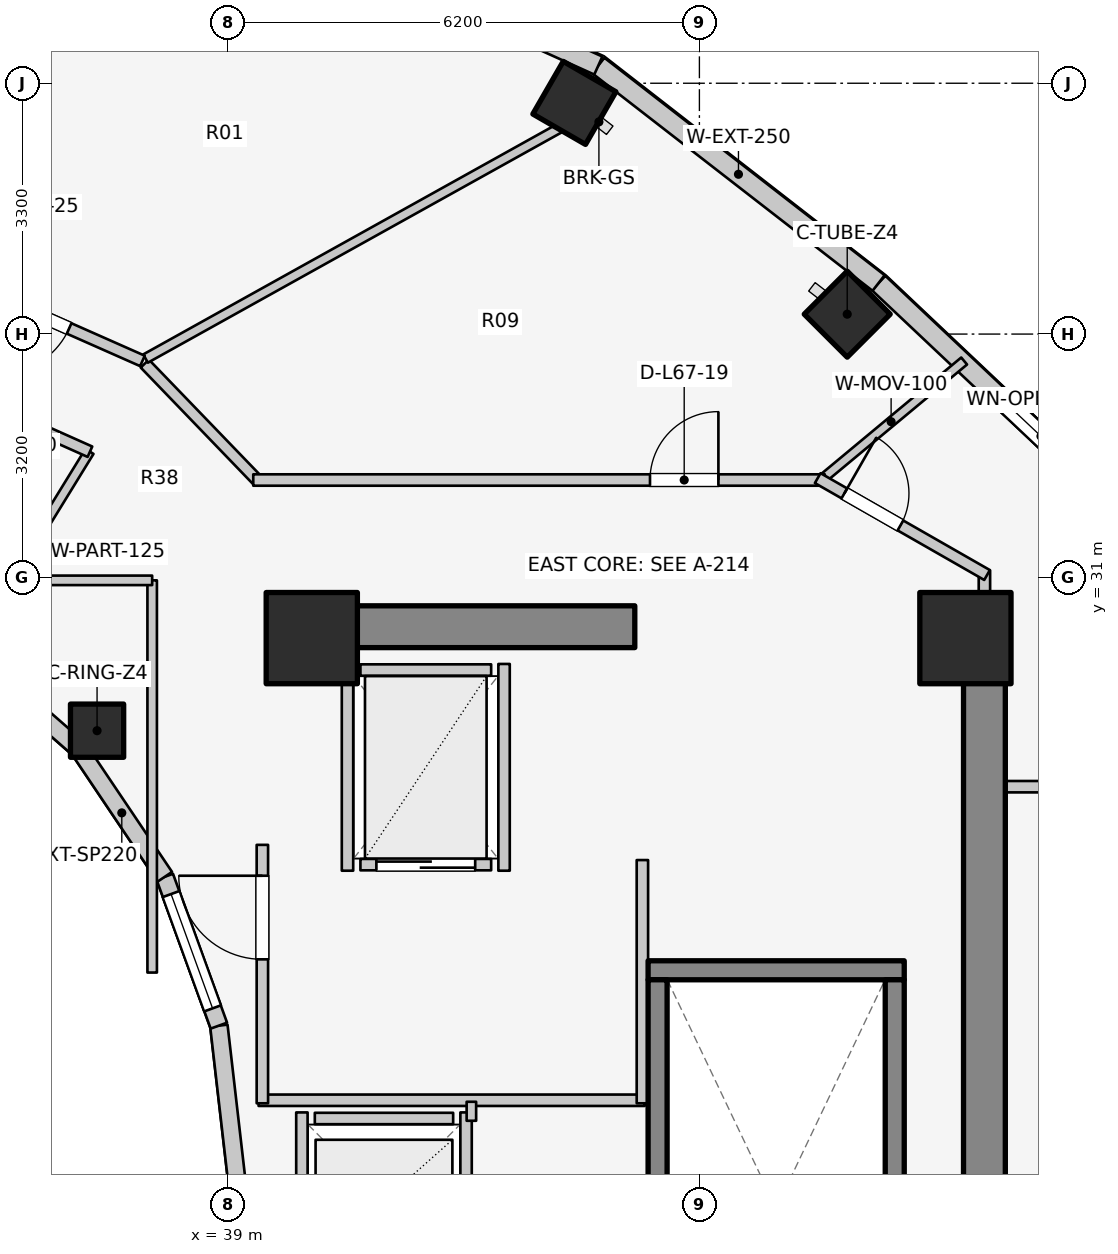
"""IFC4 building model, lengths in metres.
Left out: names, types, materials, properties, quantities, classifications, styles, units other than length and angle.
Written with IfcOpenShell. Run it as: python <this file> out.ifc"""

import sys

from ifc_helpers import new_model, si_unit, direction, frame, frame_2d, origin, origin_2d, place, context, subcontext, project, spatial, rectangle, extrude, element, fill, save


model = new_model("IFC4")
c1 = context("Model", 3, precision=1e-05, world=origin(), true_north=direction((0.0, 1.0)))
c2 = subcontext(c1, "Body", "Model", "MODEL_VIEW")
j1 = project(units=[si_unit("LENGTHUNIT", "METRE"), si_unit("PLANEANGLEUNIT", "RADIAN")], contexts=[c1])
p1 = place(None, origin())
s1 = spatial("IfcSite", under=j1, at=p1, CompositionType="ELEMENT")
p2 = place(p1, origin())
s2 = spatial("IfcBuilding", under=s1, at=p2, CompositionType="ELEMENT")
p3 = place(p2, frame((0.0, 0.0, 220.2)))
s3 = spatial("IfcBuildingStorey", under=s2, at=p3, CompositionType="ELEMENT", Elevation=220.2)
p4 = place(p3, frame((48.95, 17.05, 0.0), z_axis=(0.0, 0.0, 1.0), x_axis=(0.0, 1.0, 0.0)))
e1 = element("IfcWall", 1, at=p4, inside=s3, PredefinedType="SHEAR", context=c2, shape_type="SweptSolid", body=[
    extrude(rectangle(XDim=12.8, YDim=0.55, at=frame_2d((6.4, 0.0))), origin(), (0.0, 0.0, 1.0), 3.1),
])
p5 = place(p3, frame((39.85, 30.35, 0.0), z_axis=(0.0, 0.0, 1.0), x_axis=(1.0, 0.0, 0.0)))
e2 = element("IfcWall", 2, at=p5, inside=s3, PredefinedType="SHEAR", context=c2, shape_type="SweptSolid", body=[
    extrude(rectangle(XDim=4.5, YDim=0.55, at=frame_2d((2.25, 0.0))), origin(), (0.0, 0.0, 1.0), 3.1),
])
p6 = place(p3, frame((44.525, 25.83, 0.0), z_axis=(0.0, 0.0, 1.0), x_axis=(1.0, 0.0, 0.0)))
e3 = element("IfcWall", 3, at=p6, inside=s3, PredefinedType="SOLIDWALL", context=c2, shape_type="SweptSolid", body=[
    extrude(rectangle(XDim=3.37, YDim=0.25, at=frame_2d((1.685, 0.0))), origin(), (0.0, 0.0, 1.0), 3.1),
])
for number, where, z_axis, x_axis in (
    (4, (44.65, 17.895, 0.0), (0.0, 0.0, 1.0), (0.0, 1.0, 0.0)),
    (5, (47.77, 17.895, 0.0), (0.0, 0.0, 1.0), (0.0, 1.0, 0.0)),
):
    element("IfcWall", number, at=place(p3, frame(where, z_axis=z_axis, x_axis=x_axis)), inside=s3, PredefinedType="SOLIDWALL", context=c2, shape_type="SweptSolid", body=[
        extrude(rectangle(XDim=7.81, YDim=0.25, at=frame_2d((3.905, 0.0))), origin(), (0.0, 0.0, 1.0), 3.1),
    ])
for number, where, z_axis, x_axis in (
    (6, (48.7, 30.2, 0.0), (0.0, 0.0, 1.0), (1.0, 0.0, 0.0)),
    (7, (40.1, 30.2, 0.0), (0.0, 0.0, 1.0), (1.0, 0.0, 0.0)),
):
    element("IfcColumn", number, at=place(p3, frame(where, z_axis=z_axis, x_axis=x_axis)), inside=s3, PredefinedType="COLUMN", context=c2, shape_type="SweptSolid", body=[
        extrude(rectangle(XDim=1.2, YDim=1.2, at=origin_2d()), origin(), (0.0, 0.0, 1.0), 3.1),
    ])
p7 = place(p3, frame((37.275, 28.982, 0.0), z_axis=(0.0, 0.0, 1.0), x_axis=(1.0, 0.0, 0.0)))
e8 = element("IfcColumn", 8, at=p7, inside=s3, PredefinedType="COLUMN", context=c2, shape_type="SweptSolid", body=[
    extrude(rectangle(XDim=0.7, YDim=0.7, at=origin_2d()), origin(), (0.0, 0.0, 1.0), 3.1),
])
for number, where, z_axis, x_axis in (
    (9, (47.145, 34.462, 0.0), (0.0, 0.0, 1.0), (0.707, 0.707, 0.0)),
    (10, (43.555, 37.241, 0.0), (0.0, 0.0, 1.0), (0.5, 0.866, 0.0)),
):
    element("IfcColumn", number, at=place(p3, frame(where, z_axis=z_axis, x_axis=x_axis)), inside=s3, PredefinedType="COLUMN", context=c2, shape_type="SweptSolid", body=[
        extrude(rectangle(XDim=0.8, YDim=0.8, at=origin_2d()), origin(), (0.0, 0.0, 1.0), 3.1),
    ])
p8 = place(p3, frame((39.12, 23.0, 0.0), z_axis=(0.0, 0.0, 1.0), x_axis=(-0.114711713601, 0.993398823617, 0.0)))
e11 = element("IfcWall", 11, at=p8, inside=s3, PredefinedType="STANDARD", context=c2, shape_type="SweptSolid", body=[
    extrude(rectangle(XDim=2.115, YDim=0.23, at=frame_2d((1.058, 0.0))), origin(), (0.0, 0.0, 1.0), 2.84),
])
p9 = place(p3, frame((38.877, 25.102, 0.0), z_axis=(0.0, 0.0, 1.0), x_axis=(-0.341423187295, 0.93990968033, 0.0)))
e12 = element("IfcWall", 12, at=p9, inside=s3, PredefinedType="STANDARD", context=c2, shape_type="SweptSolid", body=[
    extrude(rectangle(XDim=2.084, YDim=0.23, at=frame_2d((1.042, 0.0))), origin(), (0.0, 0.0, 1.0), 2.84),
])
p10 = place(p9, frame((0.242, 0.0, 0.85)))
e13 = element("IfcOpeningElement", 13, at=p10, cuts=e12, PredefinedType="OPENING", context=c2, shape_type="SweptSolid", body=[
    extrude(rectangle(XDim=1.6, YDim=1.65, at=frame_2d((0.8, 0.825))), frame((0.0, 0.125, 0.0), z_axis=(0.0, -1.0, 0.0), x_axis=(1.0, 0.0, 0.0)), (0.0, 0.0, 1.0), 0.25),
])
p11 = place(p3, frame((38.166, 27.06, 0.0), z_axis=(0.0, 0.0, 1.0), x_axis=(-0.558197800898, 0.829707909492, 0.0)))
e14 = element("IfcWall", 14, at=p11, inside=s3, PredefinedType="STANDARD", context=c2, shape_type="SweptSolid", body=[
    extrude(rectangle(XDim=2.027, YDim=0.23, at=frame_2d((1.013, 0.0))), origin(), (0.0, 0.0, 1.0), 2.16),
])
p12 = place(p3, frame((37.035, 28.742, 0.0), z_axis=(0.0, 0.0, 1.0), x_axis=(-0.752576694707, 0.658504607869, 0.0)))
e15 = element("IfcWall", 15, at=p12, inside=s3, PredefinedType="STANDARD", context=c2, shape_type="SweptSolid", body=[
    extrude(rectangle(XDim=1.959, YDim=0.23, at=frame_2d((0.98, 0.0))), origin(), (0.0, 0.0, 1.0), 2.16),
])
p13 = place(p3, frame((50.761, 31.849, 0.0), z_axis=(0.0, 0.0, 1.0), x_axis=(-0.72731899451, 0.686299555752, 0.0)))
e16 = element("IfcWall", 16, at=p13, inside=s3, PredefinedType="STANDARD", context=c2, shape_type="SweptSolid", body=[
    extrude(rectangle(XDim=4.404, YDim=0.26, at=frame_2d((2.202, 0.0))), origin(), (0.0, 0.0, 1.0), 2.85),
])
p14 = place(p13, frame((0.867, 0.0, 0.75)))
e17 = element("IfcOpeningElement", 17, at=p14, cuts=e16, PredefinedType="OPENING", context=c2, shape_type="SweptSolid", body=[
    extrude(rectangle(XDim=1.2, YDim=1.5, at=frame_2d((0.6, 0.75))), frame((0.0, 0.14, 0.0), z_axis=(0.0, -1.0, 0.0), x_axis=(1.0, 0.0, 0.0)), (0.0, 0.0, 1.0), 0.28),
])
p15 = place(p3, frame((47.558, 34.872, 0.0), z_axis=(0.0, 0.0, 1.0), x_axis=(-0.790126214723, 0.612944177563, 0.0)))
e18 = element("IfcWall", 18, at=p15, inside=s3, PredefinedType="STANDARD", context=c2, shape_type="SweptSolid", body=[
    extrude(rectangle(XDim=4.667, YDim=0.26, at=frame_2d((2.333, 0.0))), origin(), (0.0, 0.0, 1.0), 2.85),
])
p16 = place(p3, frame((43.87, 37.733, 0.0), z_axis=(0.0, 0.0, 1.0), x_axis=(-0.911427484938, 0.411460738952, 0.0)))
e19 = element("IfcWall", 19, at=p16, inside=s3, PredefinedType="STANDARD", context=c2, shape_type="SweptSolid", body=[
    extrude(rectangle(XDim=5.296, YDim=0.26, at=frame_2d((2.648, 0.0))), origin(), (0.0, 0.0, 1.0), 2.85),
])
p17 = place(p16, frame((1.898, 0.0, 0.75)))
e20 = element("IfcOpeningElement", 20, at=p17, cuts=e19, PredefinedType="OPENING", context=c2, shape_type="SweptSolid", body=[
    extrude(rectangle(XDim=1.5, YDim=1.6, at=frame_2d((0.75, 0.8))), frame((0.0, 0.14, 0.0), z_axis=(0.0, -1.0, 0.0), x_axis=(1.0, 0.0, 0.0)), (0.0, 0.0, 1.0), 0.28),
])
p18 = place(p3, frame((40.14, 23.88, 0.0), z_axis=(0.0, 0.0, 1.0), x_axis=(1.0, 0.0, 0.0)))
e21 = element("IfcWall", 21, at=p18, inside=s3, PredefinedType="SOLIDWALL", context=c2, shape_type="SweptSolid", body=[
    extrude(rectangle(XDim=1.82, YDim=0.15, at=frame_2d((0.91, 0.0))), origin(), (0.0, 0.0, 1.0), 2.12),
])
p19 = place(p3, frame((39.97, 21.64, 0.0), z_axis=(0.0, 0.0, 1.0), x_axis=(0.0, 1.0, 0.0)))
e22 = element("IfcWall", 22, at=p19, inside=s3, PredefinedType="SOLIDWALL", context=c2, shape_type="SweptSolid", body=[
    extrude(rectangle(XDim=2.32, YDim=0.15, at=frame_2d((1.16, 0.0))), origin(), (0.0, 0.0, 1.0), 2.12),
])
p20 = place(p3, frame((42.13, 21.64, 0.0), z_axis=(0.0, 0.0, 1.0), x_axis=(0.0, 1.0, 0.0)))
e23 = element("IfcWall", 23, at=p20, inside=s3, PredefinedType="SOLIDWALL", context=c2, shape_type="SweptSolid", body=[
    extrude(rectangle(XDim=2.32, YDim=0.15, at=frame_2d((1.16, 0.0))), origin(), (0.0, 0.0, 1.0), 2.855),
])
p21 = place(p3, frame((40.74, 27.22, 0.0), z_axis=(0.0, 0.0, 1.0), x_axis=(1.0, 0.0, 0.0)))
e24 = element("IfcWall", 24, at=p21, inside=s3, PredefinedType="SOLIDWALL", context=c2, shape_type="SweptSolid", body=[
    extrude(rectangle(XDim=1.72, YDim=0.15, at=frame_2d((0.86, 0.0))), origin(), (0.0, 0.0, 1.0), 2.855),
])
p22 = place(p21, frame((0.21, 0.0, 0.0)))
e25 = element("IfcOpeningElement", 25, at=p22, cuts=e24, PredefinedType="OPENING", context=c2, shape_type="SweptSolid", body=[
    extrude(rectangle(XDim=1.3, YDim=2.1, at=frame_2d((0.65, 1.05))), frame((0.0, 0.085, 0.0), z_axis=(0.0, -1.0, 0.0), x_axis=(1.0, 0.0, 0.0)), (0.0, 0.0, 1.0), 0.17),
])
p23 = place(p3, frame((40.74, 29.78, 0.0), z_axis=(0.0, 0.0, 1.0), x_axis=(1.0, 0.0, 0.0)))
e26 = element("IfcWall", 26, at=p23, inside=s3, PredefinedType="SOLIDWALL", context=c2, shape_type="SweptSolid", body=[
    extrude(rectangle(XDim=1.72, YDim=0.15, at=frame_2d((0.86, 0.0))), origin(), (0.0, 0.0, 1.0), 2.855),
])
for number, where, z_axis, x_axis in (
    (27, (40.57, 27.14, 0.0), (0.0, 0.0, 1.0), (0.0, 1.0, 0.0)),
    (28, (42.63, 27.14, 0.0), (0.0, 0.0, 1.0), (0.0, 1.0, 0.0)),
):
    element("IfcWall", number, at=place(p3, frame(where, z_axis=z_axis, x_axis=x_axis)), inside=s3, PredefinedType="SOLIDWALL", context=c2, shape_type="SweptSolid", body=[
        extrude(rectangle(XDim=2.72, YDim=0.15, at=frame_2d((1.36, 0.0))), origin(), (0.0, 0.0, 1.0), 2.855),
    ])
p24 = place(p3, frame((39.4, 24.12, 0.0), z_axis=(0.0, 0.0, 1.0), x_axis=(1.0, 0.0, 0.0)))
e29 = element("IfcWall", 29, at=p24, inside=s3, PredefinedType="PARTITIONING", context=c2, shape_type="SweptSolid", body=[
    extrude(rectangle(XDim=5.08, YDim=0.15, at=frame_2d((2.54, 0.0))), origin(), (0.0, 0.0, 1.0), 2.12),
])
p25 = place(p3, frame((44.45, 24.08, 0.0), z_axis=(0.0, 0.0, 1.0), x_axis=(0.0, 1.0, 0.0)))
e30 = element("IfcWall", 30, at=p25, inside=s3, PredefinedType="PARTITIONING", context=c2, shape_type="SweptSolid", body=[
    extrude(rectangle(XDim=3.2, YDim=0.15, at=frame_2d((1.6, 0.0))), origin(), (0.0, 0.0, 1.0), 2.855),
])
p26 = place(p3, frame((39.45, 24.08, 0.0), z_axis=(0.0, 0.0, 1.0), x_axis=(0.0, 1.0, 0.0)))
e31 = element("IfcWall", 31, at=p26, inside=s3, PredefinedType="PARTITIONING", context=c2, shape_type="SweptSolid", body=[
    extrude(rectangle(XDim=3.4, YDim=0.15, at=frame_2d((1.7, 0.0))), origin(), (0.0, 0.0, 1.0), 2.855),
])
p27 = place(p26, frame((1.894, 0.0, 0.0)))
e32 = element("IfcOpeningElement", 32, at=p27, cuts=e31, PredefinedType="OPENING", context=c2, shape_type="SweptSolid", body=[
    extrude(rectangle(XDim=1.1, YDim=2.1, at=frame_2d((0.55, 1.05))), frame((0.0, 0.085, 0.0), z_axis=(0.0, -1.0, 0.0), x_axis=(1.0, 0.0, 0.0)), (0.0, 0.0, 1.0), 0.17),
])
p28 = place(p3, frame((42.2, 23.85, 0.0), z_axis=(0.0, 0.0, 1.0), x_axis=(0.0, 1.0, 0.0)))
e33 = element("IfcWall", 33, at=p28, inside=s3, PredefinedType="PARTITIONING", context=c2, shape_type="SweptSolid", body=[
    extrude(rectangle(XDim=0.25, YDim=0.125, at=frame_2d((0.125, 0.0))), origin(), (0.0, 0.0, 1.0), 2.855),
])
p29 = place(p3, frame((35.55, 30.015, 0.0), z_axis=(0.0, 0.0, 1.0), x_axis=(0.523992004803, 0.851723182086, 0.0)))
e34 = element("IfcWall", 34, at=p29, inside=s3, PredefinedType="PARTITIONING", context=c2, shape_type="SweptSolid", body=[
    extrude(rectangle(XDim=3.101, YDim=0.125, at=frame_2d((1.551, 0.0))), origin(), (0.0, 0.0, 1.0), 2.376),
])
p30 = place(p3, frame((37.181, 32.652, 0.0), z_axis=(0.0, 0.0, 1.0), x_axis=(-0.913120130558, 0.407690602257, 0.0)))
e35 = element("IfcWall", 35, at=p30, inside=s3, PredefinedType="PARTITIONING", context=c2, shape_type="SweptSolid", body=[
    extrude(rectangle(XDim=2.743, YDim=0.15, at=frame_2d((1.371, 0.0))), origin(), (0.0, 0.0, 1.0), 2.376),
])
p31 = place(p3, frame((38.0, 25.8, 0.0), z_axis=(0.0, 0.0, 1.0), x_axis=(0.0, 1.0, 0.0)))
e36 = element("IfcWall", 36, at=p31, inside=s3, PredefinedType="PARTITIONING", context=c2, shape_type="SweptSolid", body=[
    extrude(rectangle(XDim=5.16, YDim=0.125, at=frame_2d((2.58, 0.0))), origin(), (0.0, 0.0, 1.0), 2.232),
])
p32 = place(p3, frame((35.4, 30.96, 0.0), z_axis=(0.0, 0.0, 1.0), x_axis=(1.0, 0.0, 0.0)))
e37 = element("IfcWall", 37, at=p32, inside=s3, PredefinedType="PARTITIONING", context=c2, shape_type="SweptSolid", body=[
    extrude(rectangle(XDim=2.6, YDim=0.125, at=frame_2d((1.3, 0.0))), origin(), (0.0, 0.0, 1.0), 2.376),
])
p33 = place(p3, frame((48.95, 28.245, 0.0), z_axis=(0.0, 0.0, 1.0), x_axis=(1.0, 0.0, 0.0)))
e38 = element("IfcWall", 38, at=p33, inside=s3, PredefinedType="PARTITIONING", context=c2, shape_type="SweptSolid", body=[
    extrude(rectangle(XDim=4.175, YDim=0.15, at=frame_2d((2.087, 0.0))), origin(), (0.0, 0.0, 1.0), 2.855),
])
p34 = place(p3, frame((48.95, 29.8, 0.0), z_axis=(0.0, 0.0, 1.0), x_axis=(0.0, 1.0, 0.0)))
e39 = element("IfcWall", 39, at=p34, inside=s3, PredefinedType="PARTITIONING", context=c2, shape_type="SweptSolid", body=[
    extrude(rectangle(XDim=1.29, YDim=0.15, at=frame_2d((0.645, 0.0))), origin(), (0.0, 0.0, 1.0), 2.855),
])
p35 = place(p3, frame((46.762, 32.248, 0.0), z_axis=(0.0, 0.0, 1.0), x_axis=(0.76890954941, 0.639357571962, 0.0)))
e40 = element("IfcWall", 40, at=p35, inside=s3, PredefinedType="MOVABLE", context=c2, shape_type="SweptSolid", body=[
    extrude(rectangle(XDim=2.499, YDim=0.12, at=frame_2d((1.25, 0.0))), origin(), (0.0, 0.0, 1.0), 2.22),
])
p36 = place(p3, frame((37.903, 33.812, 0.0), z_axis=(0.0, 0.0, 1.0), x_axis=(0.694032962553, -0.719943224768, 0.0)))
e41 = element("IfcWall", 41, at=p36, inside=s3, PredefinedType="PARTITIONING", context=c2, shape_type="SweptSolid", body=[
    extrude(rectangle(XDim=2.158, YDim=0.15, at=frame_2d((1.079, 0.0))), origin(), (0.0, 0.0, 1.0), 2.376),
])
p37 = place(p3, frame((39.33, 32.28, 0.0), z_axis=(0.0, 0.0, 1.0), x_axis=(1.0, 0.0, 0.0)))
e42 = element("IfcWall", 42, at=p37, inside=s3, PredefinedType="PARTITIONING", context=c2, shape_type="SweptSolid", body=[
    extrude(rectangle(XDim=7.52, YDim=0.15, at=frame_2d((3.76, 0.0))), origin(), (0.0, 0.0, 1.0), 2.376),
])
p38 = place(p37, frame((5.22, 0.0, 0.0)))
e43 = element("IfcOpeningElement", 43, at=p38, cuts=e42, PredefinedType="OPENING", context=c2, shape_type="SweptSolid", body=[
    extrude(rectangle(XDim=0.9, YDim=2.1, at=frame_2d((0.45, 1.05))), frame((0.0, 0.085, 0.0), z_axis=(0.0, -1.0, 0.0), x_axis=(1.0, 0.0, 0.0)), (0.0, 0.0, 1.0), 0.17),
])
p39 = place(p3, frame((46.757, 32.305, 0.0), z_axis=(0.0, 0.0, 1.0), x_axis=(0.867991349648, -0.496579315857, 0.0)))
e44 = element("IfcWall", 44, at=p39, inside=s3, PredefinedType="PARTITIONING", context=c2, shape_type="SweptSolid", body=[
    extrude(rectangle(XDim=2.567, YDim=0.15, at=frame_2d((1.283, 0.0))), origin(), (0.0, 0.0, 1.0), 2.22),
])
p40 = place(p39, frame((0.404, 0.0, 0.0)))
e45 = element("IfcOpeningElement", 45, at=p40, cuts=e44, PredefinedType="OPENING", context=c2, shape_type="SweptSolid", body=[
    extrude(rectangle(XDim=0.85, YDim=2.05, at=frame_2d((0.425, 1.025))), frame((0.0, 0.085, 0.0), z_axis=(0.0, -1.0, 0.0), x_axis=(1.0, 0.0, 0.0)), (0.0, 0.0, 1.0), 0.17),
])
p41 = place(p3, frame((37.913, 33.878, 0.0), z_axis=(0.0, 0.0, 1.0), x_axis=(0.87377679808, 0.486327160599, 0.0)))
e46 = element("IfcWall", 46, at=p41, inside=s3, PredefinedType="PARTITIONING", context=c2, shape_type="SweptSolid", body=[
    extrude(rectangle(XDim=6.24, YDim=0.125, at=frame_2d((3.12, 0.0))), origin(), (0.0, 0.0, 1.0), 2.376),
])
p42 = place(p3, frame((37.872, 33.847, 0.0), z_axis=(0.0, 0.0, 1.0), x_axis=(-0.914490094652, 0.40460828808, 0.0)))
e47 = element("IfcWall", 47, at=p42, inside=s3, PredefinedType="PARTITIONING", context=c2, shape_type="SweptSolid", body=[
    extrude(rectangle(XDim=3.11, YDim=0.15, at=frame_2d((1.555, 0.0))), origin(), (0.0, 0.0, 1.0), 2.376),
])
p43 = place(p42, frame((1.055, 0.0, 0.0)))
e48 = element("IfcOpeningElement", 48, at=p43, cuts=e47, PredefinedType="OPENING", context=c2, shape_type="SweptSolid", body=[
    extrude(rectangle(XDim=1.0, YDim=2.1, at=frame_2d((0.5, 1.05))), frame((0.0, 0.085, 0.0), z_axis=(0.0, -1.0, 0.0), x_axis=(1.0, 0.0, 0.0)), (0.0, 0.0, 1.0), 0.17),
])
p44 = place(p10, origin())
e49 = element("IfcWindow", 49, at=p44, inside=s3, PartitioningType="SINGLE_PANEL", PredefinedType="WINDOW", context=c2, shape_type="SweptSolid", body=[
    extrude(rectangle(XDim=1.6, YDim=1.65, at=frame_2d((0.8, 0.825))), frame((0.0, 0.03, 0.0), z_axis=(0.0, -1.0, 0.0), x_axis=(1.0, 0.0, 0.0)), (0.0, 0.0, 1.0), 0.06),
])
fill(e13, e49)
p45 = place(p14, origin())
e50 = element("IfcWindow", 50, at=p45, inside=s3, PartitioningType="SINGLE_PANEL", PredefinedType="WINDOW", context=c2, shape_type="SweptSolid", body=[
    extrude(rectangle(XDim=1.2, YDim=1.5, at=frame_2d((0.6, 0.75))), frame((0.0, 0.03, 0.0), z_axis=(0.0, -1.0, 0.0), x_axis=(1.0, 0.0, 0.0)), (0.0, 0.0, 1.0), 0.06),
])
fill(e17, e50)
p46 = place(p22, origin())
e51 = element("IfcDoor", 51, at=p46, inside=s3, OperationType="DOUBLE_DOOR_SLIDING", PredefinedType="DOOR", context=c2, shape_type="SweptSolid", body=[
    extrude(rectangle(XDim=1.3, YDim=2.1, at=frame_2d((0.65, 1.05))), frame((0.0, 0.025, 0.0), z_axis=(0.0, -1.0, 0.0), x_axis=(1.0, 0.0, 0.0)), (0.0, 0.0, 1.0), 0.05),
])
fill(e25, e51)
p47 = place(p27, origin())
e52 = element("IfcDoor", 52, at=p47, inside=s3, OperationType="SINGLE_SWING_RIGHT", PredefinedType="DOOR", context=c2, shape_type="SweptSolid", body=[
    extrude(rectangle(XDim=1.1, YDim=2.1, at=frame_2d((0.55, 1.05))), frame((0.0, 0.025, 0.0), z_axis=(0.0, -1.0, 0.0), x_axis=(1.0, 0.0, 0.0)), (0.0, 0.0, 1.0), 0.05),
])
fill(e32, e52)
p48 = place(p38, origin())
e53 = element("IfcDoor", 53, at=p48, inside=s3, OperationType="SINGLE_SWING_RIGHT", PredefinedType="DOOR", context=c2, shape_type="SweptSolid", body=[
    extrude(rectangle(XDim=0.9, YDim=2.1, at=frame_2d((0.45, 1.05))), frame((0.0, 0.025, 0.0), z_axis=(0.0, -1.0, 0.0), x_axis=(1.0, 0.0, 0.0)), (0.0, 0.0, 1.0), 0.05),
])
fill(e43, e53)
p49 = place(p40, origin())
e54 = element("IfcDoor", 54, at=p49, inside=s3, OperationType="SINGLE_SWING_LEFT", PredefinedType="DOOR", context=c2, shape_type="SweptSolid", body=[
    extrude(rectangle(XDim=0.85, YDim=2.05, at=frame_2d((0.425, 1.025))), frame((0.0, 0.025, 0.0), z_axis=(0.0, -1.0, 0.0), x_axis=(1.0, 0.0, 0.0)), (0.0, 0.0, 1.0), 0.05),
])
fill(e45, e54)
p50 = place(p43, origin())
e55 = element("IfcDoor", 55, at=p50, inside=s3, OperationType="SINGLE_SWING_RIGHT", PredefinedType="DOOR", context=c2, shape_type="SweptSolid", body=[
    extrude(rectangle(XDim=1.0, YDim=2.1, at=frame_2d((0.5, 1.05))), frame((0.0, 0.025, 0.0), z_axis=(0.0, -1.0, 0.0), x_axis=(1.0, 0.0, 0.0)), (0.0, 0.0, 1.0), 0.05),
])
fill(e48, e55)
save(model, sys.argv[1])
